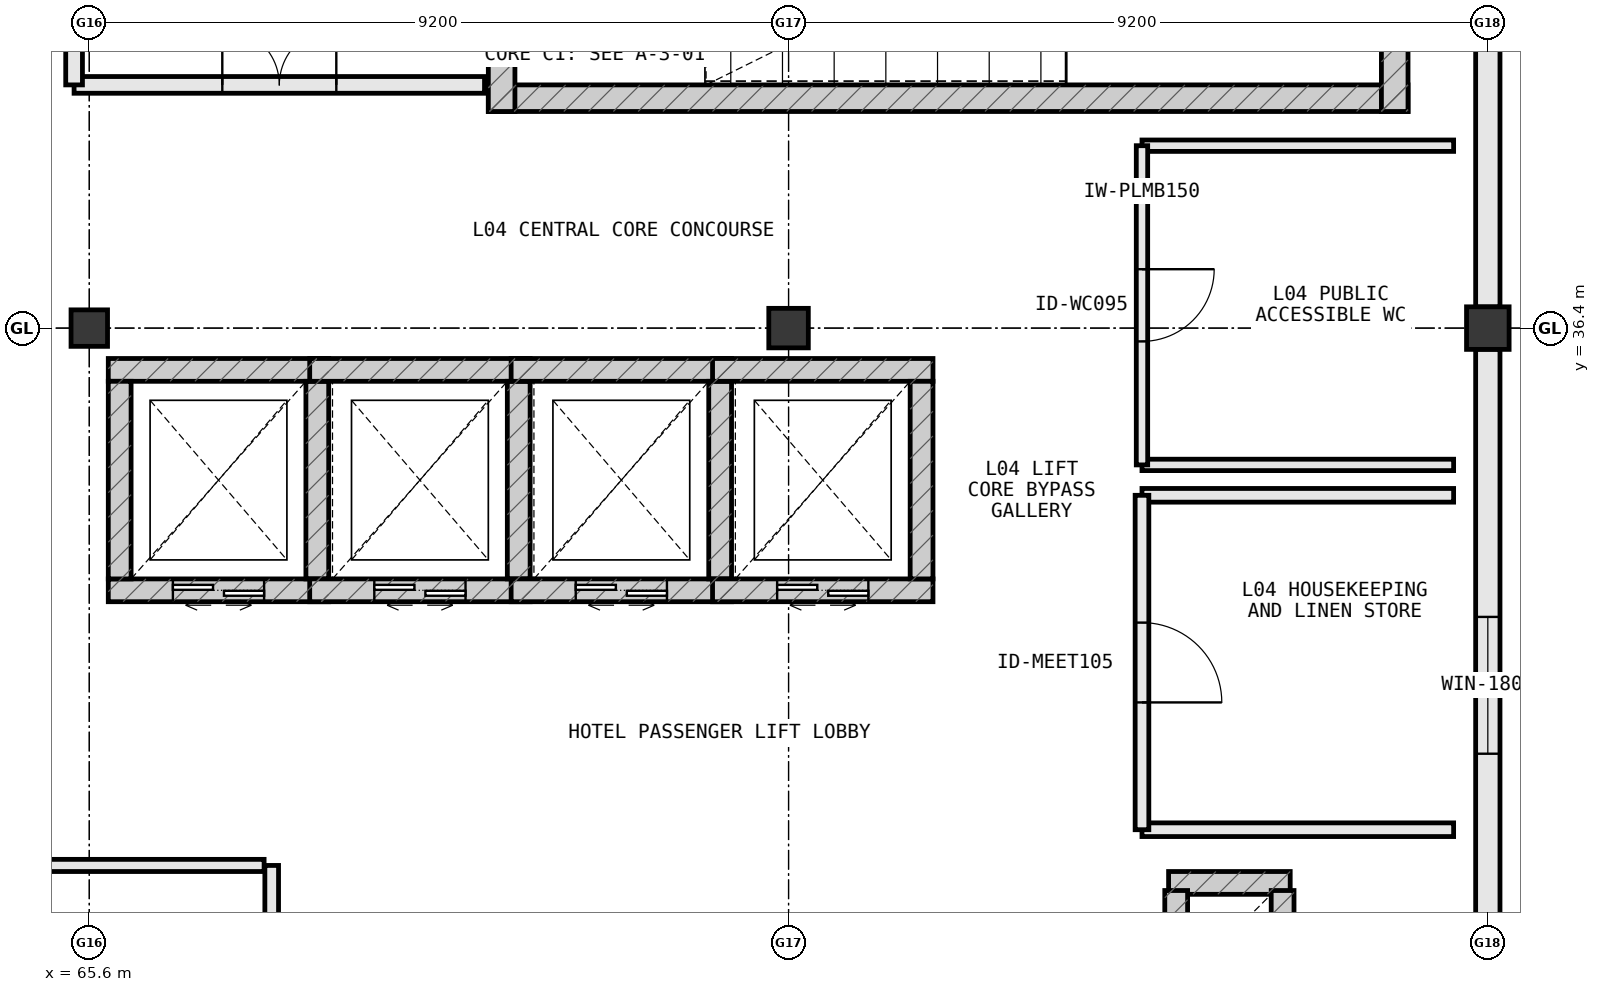
"""IFC4 building model, lengths in metres.
Left out: names, types, materials, properties, quantities, classifications, styles, units other than length and angle.
Written with IfcOpenShell. Run it as: python <this file> out.ifc"""

import sys

from ifc_helpers import new_model, si_unit, direction, frame, frame_2d, origin, origin_2d, place, context, subcontext, project, spatial, rectangle, extrude, element, fill, save


model = new_model("IFC4")
c1 = context("Model", 3, precision=1e-05, world=origin(), true_north=direction((0.0, 1.0)))
c2 = subcontext(c1, "Body", "Model", "MODEL_VIEW")
j1 = project(units=[si_unit("LENGTHUNIT", "METRE"), si_unit("PLANEANGLEUNIT", "RADIAN")], contexts=[c1])
p1 = place(None, origin())
s1 = spatial("IfcSite", under=j1, at=p1, CompositionType="ELEMENT")
p2 = place(p1, origin())
s2 = spatial("IfcBuilding", under=s1, at=p2, CompositionType="ELEMENT")
p3 = place(p2, frame((0.0, 0.0, 20.0)))
s3 = spatial("IfcBuildingStorey", under=s2, at=p3, CompositionType="ELEMENT", Elevation=20.0)
p4 = place(p3, frame((74.8, 36.4, 0.0), z_axis=(0.0, 0.0, 1.0), x_axis=(1.0, 0.0, 0.0)))
e1 = element("IfcColumn", 1, at=p4, inside=s3, PredefinedType="COLUMN", context=c2, shape_type="SweptSolid", body=[
    extrude(rectangle(XDim=0.52, YDim=0.52, at=origin_2d()), origin(), (0.0, 0.0, 1.0), 3.8),
])
p5 = place(p3, frame((84.0, 36.4, 0.0), z_axis=(0.0, 0.0, 1.0), x_axis=(1.0, 0.0, 0.0)))
e2 = element("IfcColumn", 2, at=p5, inside=s3, PredefinedType="COLUMN", context=c2, shape_type="SweptSolid", body=[
    extrude(rectangle(XDim=0.56, YDim=0.56, at=origin_2d()), origin(), (0.0, 0.0, 1.0), 3.8),
])
p6 = place(p3, frame((65.6, 36.4, 0.0), z_axis=(0.0, 0.0, 1.0), x_axis=(1.0, 0.0, 0.0)))
e3 = element("IfcColumn", 3, at=p6, inside=s3, PredefinedType="COLUMN", context=c2, shape_type="SweptSolid", body=[
    extrude(rectangle(XDim=0.48, YDim=0.48, at=origin_2d()), origin(), (0.0, 0.0, 1.0), 3.8),
])
p7 = place(p3, frame((81.4, 29.1, 0.0), z_axis=(0.0, 0.0, 1.0), x_axis=(-1.0, 0.0, 0.0)))
e4 = element("IfcWall", 4, at=p7, inside=s3, PredefinedType="SHEAR", context=c2, shape_type="SweptSolid", body=[
    extrude(rectangle(XDim=1.6, YDim=0.3, at=frame_2d((0.8, 0.0))), origin(), (0.0, 0.0, 1.0), 3.55),
])
for number, where, z_axis, x_axis in (
    (5, (79.9, 29.0, 0.0), (0.0, 0.0, 1.0), (0.0, -1.0, 0.0)),
    (6, (81.3, 27.8, 0.0), (0.0, 0.0, 1.0), (0.0, 1.0, 0.0)),
):
    element("IfcWall", number, at=place(p3, frame(where, z_axis=z_axis, x_axis=x_axis)), inside=s3, PredefinedType="SHEAR", context=c2, shape_type="SweptSolid", body=[
        extrude(rectangle(XDim=1.2, YDim=0.3, at=frame_2d((0.6, 0.0))), origin(), (0.0, 0.0, 1.0), 3.55),
    ])
p8 = place(p3, frame((84.0, 27.278, 0.0), z_axis=(0.0, 0.0, 1.0), x_axis=(0.0, 1.0, 0.0)))
e7 = element("IfcWall", 7, at=p8, inside=s3, PredefinedType="STANDARD", context=c2, shape_type="SweptSolid", body=[
    extrude(rectangle(XDim=8.844, YDim=0.32, at=frame_2d((4.422, 0.0))), origin(), (0.0, 0.0, 1.0), 2.965),
])
p9 = place(p8, frame((3.522, 0.0, 0.85)))
e8 = element("IfcOpeningElement", 8, at=p9, cuts=e7, PredefinedType="OPENING", context=c2, shape_type="SweptSolid", body=[
    extrude(rectangle(XDim=1.8, YDim=1.85, at=frame_2d((0.9, 0.925))), frame((0.0, 0.172, 0.0), z_axis=(0.0, -1.0, 0.0), x_axis=(1.0, 0.0, 0.0)), (0.0, 0.0, 1.0), 0.344),
])
p10 = place(p3, frame((84.0, 36.678, 0.0), z_axis=(0.0, 0.0, 1.0), x_axis=(0.0, 1.0, 0.0)))
e9 = element("IfcWall", 9, at=p10, inside=s3, PredefinedType="STANDARD", context=c2, shape_type="SweptSolid", body=[
    extrude(rectangle(XDim=10.244, YDim=0.32, at=frame_2d((5.122, 0.0))), origin(), (0.0, 0.0, 1.0), 2.965),
])
p11 = place(p10, frame((6.783, 0.0, 0.85)))
e10 = element("IfcOpeningElement", 10, at=p11, cuts=e9, PredefinedType="OPENING", context=c2, shape_type="SweptSolid", body=[
    extrude(rectangle(XDim=1.8, YDim=1.85, at=frame_2d((0.9, 0.925))), frame((0.0, 0.172, 0.0), z_axis=(0.0, -1.0, 0.0), x_axis=(1.0, 0.0, 0.0)), (0.0, 0.0, 1.0), 0.344),
])
p12 = place(p3, frame((70.85, 39.425, 0.0), z_axis=(0.0, 0.0, 1.0), x_axis=(1.0, 0.0, 0.0)))
e11 = element("IfcWall", 11, at=p12, inside=s3, PredefinedType="SHEAR", context=c2, shape_type="SweptSolid", body=[
    extrude(rectangle(XDim=12.1, YDim=0.35, at=frame_2d((6.05, 0.0))), origin(), (0.0, 0.0, 1.0), 3.8),
])
p13 = place(p3, frame((82.775, 39.25, 0.0), z_axis=(0.0, 0.0, 1.0), x_axis=(0.0, 1.0, 0.0)))
e12 = element("IfcWall", 12, at=p13, inside=s3, PredefinedType="SHEAR", context=c2, shape_type="SweptSolid", body=[
    extrude(rectangle(XDim=5.1, YDim=0.35, at=frame_2d((2.55, 0.0))), origin(), (0.0, 0.0, 1.0), 3.8),
])
p14 = place(p3, frame((71.025, 44.35, 0.0), z_axis=(0.0, 0.0, 1.0), x_axis=(0.0, -1.0, 0.0)))
e13 = element("IfcWall", 13, at=p14, inside=s3, PredefinedType="SHEAR", context=c2, shape_type="SweptSolid", body=[
    extrude(rectangle(XDim=5.1, YDim=0.35, at=frame_2d((2.55, 0.0))), origin(), (0.0, 0.0, 1.0), 3.8),
])
p15 = place(p14, frame((2.0, 0.0, 0.0)))
e14 = element("IfcOpeningElement", 14, at=p15, cuts=e13, PredefinedType="OPENING", context=c2, shape_type="SweptSolid", body=[
    extrude(rectangle(XDim=1.1, YDim=2.2, at=frame_2d((0.55, 1.1))), frame((0.0, 0.187, 0.0), z_axis=(0.0, -1.0, 0.0), x_axis=(1.0, 0.0, 0.0)), (0.0, 0.0, 1.0), 0.374),
])
p16 = place(p3, frame((65.85, 32.95, 0.0), z_axis=(0.0, 0.0, 1.0), x_axis=(1.0, 0.0, 0.0)))
e15 = element("IfcWall", 15, at=p16, inside=s3, PredefinedType="SHEAR", context=c2, shape_type="SweptSolid", body=[
    extrude(rectangle(XDim=2.9, YDim=0.3, at=frame_2d((1.45, 0.0))), origin(), (0.0, 0.0, 1.0), 3.8),
])
p17 = place(p16, frame((0.85, 0.0, 0.0)))
e16 = element("IfcOpeningElement", 16, at=p17, cuts=e15, PredefinedType="OPENING", context=c2, shape_type="SweptSolid", body=[
    extrude(rectangle(XDim=1.2, YDim=2.2, at=frame_2d((0.6, 1.1))), frame((0.0, 0.162, 0.0), z_axis=(0.0, -1.0, 0.0), x_axis=(1.0, 0.0, 0.0)), (0.0, 0.0, 1.0), 0.324),
])
p18 = place(p3, frame((68.75, 35.85, 0.0), z_axis=(0.0, 0.0, 1.0), x_axis=(-1.0, 0.0, 0.0)))
e17 = element("IfcWall", 17, at=p18, inside=s3, PredefinedType="SHEAR", context=c2, shape_type="SweptSolid", body=[
    extrude(rectangle(XDim=2.9, YDim=0.3, at=frame_2d((1.45, 0.0))), origin(), (0.0, 0.0, 1.0), 3.8),
])
for number, where, z_axis, x_axis in (
    (18, (68.6, 33.1, 0.0), (0.0, 0.0, 1.0), (0.0, 1.0, 0.0)),
    (19, (66.0, 35.7, 0.0), (0.0, 0.0, 1.0), (0.0, -1.0, 0.0)),
):
    element("IfcWall", number, at=place(p3, frame(where, z_axis=z_axis, x_axis=x_axis)), inside=s3, PredefinedType="SHEAR", context=c2, shape_type="SweptSolid", body=[
        extrude(rectangle(XDim=2.6, YDim=0.3, at=frame_2d((1.3, 0.0))), origin(), (0.0, 0.0, 1.0), 3.8),
    ])
p19 = place(p3, frame((68.5, 32.95, 0.0), z_axis=(0.0, 0.0, 1.0), x_axis=(1.0, 0.0, 0.0)))
e20 = element("IfcWall", 20, at=p19, inside=s3, PredefinedType="SHEAR", context=c2, shape_type="SweptSolid", body=[
    extrude(rectangle(XDim=2.9, YDim=0.3, at=frame_2d((1.45, 0.0))), origin(), (0.0, 0.0, 1.0), 3.8),
])
p20 = place(p19, frame((0.85, 0.0, 0.0)))
e21 = element("IfcOpeningElement", 21, at=p20, cuts=e20, PredefinedType="OPENING", context=c2, shape_type="SweptSolid", body=[
    extrude(rectangle(XDim=1.2, YDim=2.2, at=frame_2d((0.6, 1.1))), frame((0.0, 0.162, 0.0), z_axis=(0.0, -1.0, 0.0), x_axis=(1.0, 0.0, 0.0)), (0.0, 0.0, 1.0), 0.324),
])
p21 = place(p3, frame((71.4, 35.85, 0.0), z_axis=(0.0, 0.0, 1.0), x_axis=(-1.0, 0.0, 0.0)))
e22 = element("IfcWall", 22, at=p21, inside=s3, PredefinedType="SHEAR", context=c2, shape_type="SweptSolid", body=[
    extrude(rectangle(XDim=2.9, YDim=0.3, at=frame_2d((1.45, 0.0))), origin(), (0.0, 0.0, 1.0), 3.8),
])
p22 = place(p3, frame((71.25, 33.1, 0.0), z_axis=(0.0, 0.0, 1.0), x_axis=(0.0, 1.0, 0.0)))
e23 = element("IfcWall", 23, at=p22, inside=s3, PredefinedType="SHEAR", context=c2, shape_type="SweptSolid", body=[
    extrude(rectangle(XDim=2.6, YDim=0.3, at=frame_2d((1.3, 0.0))), origin(), (0.0, 0.0, 1.0), 3.8),
])
p23 = place(p3, frame((71.15, 32.95, 0.0), z_axis=(0.0, 0.0, 1.0), x_axis=(1.0, 0.0, 0.0)))
e24 = element("IfcWall", 24, at=p23, inside=s3, PredefinedType="SHEAR", context=c2, shape_type="SweptSolid", body=[
    extrude(rectangle(XDim=2.9, YDim=0.3, at=frame_2d((1.45, 0.0))), origin(), (0.0, 0.0, 1.0), 3.8),
])
p24 = place(p23, frame((0.85, 0.0, 0.0)))
e25 = element("IfcOpeningElement", 25, at=p24, cuts=e24, PredefinedType="OPENING", context=c2, shape_type="SweptSolid", body=[
    extrude(rectangle(XDim=1.2, YDim=2.2, at=frame_2d((0.6, 1.1))), frame((0.0, 0.162, 0.0), z_axis=(0.0, -1.0, 0.0), x_axis=(1.0, 0.0, 0.0)), (0.0, 0.0, 1.0), 0.324),
])
p25 = place(p3, frame((74.05, 35.85, 0.0), z_axis=(0.0, 0.0, 1.0), x_axis=(-1.0, 0.0, 0.0)))
e26 = element("IfcWall", 26, at=p25, inside=s3, PredefinedType="SHEAR", context=c2, shape_type="SweptSolid", body=[
    extrude(rectangle(XDim=2.9, YDim=0.3, at=frame_2d((1.45, 0.0))), origin(), (0.0, 0.0, 1.0), 3.8),
])
p26 = place(p3, frame((73.9, 33.1, 0.0), z_axis=(0.0, 0.0, 1.0), x_axis=(0.0, 1.0, 0.0)))
e27 = element("IfcWall", 27, at=p26, inside=s3, PredefinedType="SHEAR", context=c2, shape_type="SweptSolid", body=[
    extrude(rectangle(XDim=2.6, YDim=0.3, at=frame_2d((1.3, 0.0))), origin(), (0.0, 0.0, 1.0), 3.8),
])
p27 = place(p3, frame((73.8, 32.95, 0.0), z_axis=(0.0, 0.0, 1.0), x_axis=(1.0, 0.0, 0.0)))
e28 = element("IfcWall", 28, at=p27, inside=s3, PredefinedType="SHEAR", context=c2, shape_type="SweptSolid", body=[
    extrude(rectangle(XDim=2.9, YDim=0.3, at=frame_2d((1.45, 0.0))), origin(), (0.0, 0.0, 1.0), 3.8),
])
p28 = place(p27, frame((0.85, 0.0, 0.0)))
e29 = element("IfcOpeningElement", 29, at=p28, cuts=e28, PredefinedType="OPENING", context=c2, shape_type="SweptSolid", body=[
    extrude(rectangle(XDim=1.2, YDim=2.2, at=frame_2d((0.6, 1.1))), frame((0.0, 0.162, 0.0), z_axis=(0.0, -1.0, 0.0), x_axis=(1.0, 0.0, 0.0)), (0.0, 0.0, 1.0), 0.324),
])
p29 = place(p3, frame((76.7, 35.85, 0.0), z_axis=(0.0, 0.0, 1.0), x_axis=(-1.0, 0.0, 0.0)))
e30 = element("IfcWall", 30, at=p29, inside=s3, PredefinedType="SHEAR", context=c2, shape_type="SweptSolid", body=[
    extrude(rectangle(XDim=2.9, YDim=0.3, at=frame_2d((1.45, 0.0))), origin(), (0.0, 0.0, 1.0), 3.8),
])
p30 = place(p3, frame((76.55, 33.1, 0.0), z_axis=(0.0, 0.0, 1.0), x_axis=(0.0, 1.0, 0.0)))
e31 = element("IfcWall", 31, at=p30, inside=s3, PredefinedType="SHEAR", context=c2, shape_type="SweptSolid", body=[
    extrude(rectangle(XDim=2.6, YDim=0.3, at=frame_2d((1.3, 0.0))), origin(), (0.0, 0.0, 1.0), 3.8),
])
p31 = place(p3, frame((65.4, 39.6, 0.0), z_axis=(0.0, 0.0, 1.0), x_axis=(1.0, 0.0, 0.0)))
e32 = element("IfcWall", 32, at=p31, inside=s3, PredefinedType="STANDARD", context=c2, shape_type="SweptSolid", body=[
    extrude(rectangle(XDim=5.4, YDim=0.22, at=frame_2d((2.7, 0.0))), origin(), (0.0, 0.0, 1.0), 3.55),
])
p32 = place(p31, frame((1.95, 0.0, 0.0)))
e33 = element("IfcOpeningElement", 33, at=p32, cuts=e32, PredefinedType="OPENING", context=c2, shape_type="SweptSolid", body=[
    extrude(rectangle(XDim=1.5, YDim=2.2, at=frame_2d((0.75, 1.1))), frame((0.0, 0.122, 0.0), z_axis=(0.0, -1.0, 0.0), x_axis=(1.0, 0.0, 0.0)), (0.0, 0.0, 1.0), 0.244),
])
p33 = place(p3, frame((65.4, 43.85, 0.0), z_axis=(0.0, 0.0, 1.0), x_axis=(0.0, -1.0, 0.0)))
e34 = element("IfcWall", 34, at=p33, inside=s3, PredefinedType="STANDARD", context=c2, shape_type="SweptSolid", body=[
    extrude(rectangle(XDim=4.25, YDim=0.22, at=frame_2d((2.125, 0.0))), origin(), (0.0, 0.0, 1.0), 3.55),
])
p34 = place(p33, frame((1.375, 0.0, 0.0)))
e35 = element("IfcOpeningElement", 35, at=p34, cuts=e34, PredefinedType="OPENING", context=c2, shape_type="SweptSolid", body=[
    extrude(rectangle(XDim=1.5, YDim=2.2, at=frame_2d((0.75, 1.1))), frame((0.0, 0.122, 0.0), z_axis=(0.0, -1.0, 0.0), x_axis=(1.0, 0.0, 0.0)), (0.0, 0.0, 1.0), 0.244),
])
for number, where, z_axis, x_axis in (
    (36, (79.45, 29.8, 0.0), (0.0, 0.0, 1.0), (1.0, 0.0, 0.0)),
    (37, (83.55, 34.2, 0.0), (0.0, 0.0, 1.0), (-1.0, 0.0, 0.0)),
):
    element("IfcWall", number, at=place(p3, frame(where, z_axis=z_axis, x_axis=x_axis)), inside=s3, PredefinedType="PARTITIONING", context=c2, shape_type="SweptSolid", body=[
        extrude(rectangle(XDim=4.1, YDim=0.18, at=frame_2d((2.05, 0.0))), origin(), (0.0, 0.0, 1.0), 3.55),
    ])
p35 = place(p3, frame((79.45, 34.2, 0.0), z_axis=(0.0, 0.0, 1.0), x_axis=(0.0, -1.0, 0.0)))
e38 = element("IfcWall", 38, at=p35, inside=s3, PredefinedType="PARTITIONING", context=c2, shape_type="SweptSolid", body=[
    extrude(rectangle(XDim=4.4, YDim=0.18, at=frame_2d((2.2, 0.0))), origin(), (0.0, 0.0, 1.0), 3.55),
])
p36 = place(p35, frame((1.675, 0.0, 0.0)))
e39 = element("IfcOpeningElement", 39, at=p36, cuts=e38, PredefinedType="OPENING", context=c2, shape_type="SweptSolid", body=[
    extrude(rectangle(XDim=1.05, YDim=2.2, at=frame_2d((0.525, 1.1))), frame((0.0, 0.102, 0.0), z_axis=(0.0, -1.0, 0.0), x_axis=(1.0, 0.0, 0.0)), (0.0, 0.0, 1.0), 0.204),
])
for number, where, z_axis, x_axis in (
    (40, (79.45, 34.6, 0.0), (0.0, 0.0, 1.0), (1.0, 0.0, 0.0)),
    (41, (83.55, 38.8, 0.0), (0.0, 0.0, 1.0), (-1.0, 0.0, 0.0)),
):
    element("IfcWall", number, at=place(p3, frame(where, z_axis=z_axis, x_axis=x_axis)), inside=s3, PredefinedType="PLUMBINGWALL", context=c2, shape_type="SweptSolid", body=[
        extrude(rectangle(XDim=4.1, YDim=0.15, at=frame_2d((2.05, 0.0))), origin(), (0.0, 0.0, 1.0), 3.55),
    ])
p37 = place(p3, frame((79.45, 38.8, 0.0), z_axis=(0.0, 0.0, 1.0), x_axis=(0.0, -1.0, 0.0)))
e42 = element("IfcWall", 42, at=p37, inside=s3, PredefinedType="PLUMBINGWALL", context=c2, shape_type="SweptSolid", body=[
    extrude(rectangle(XDim=4.2, YDim=0.15, at=frame_2d((2.1, 0.0))), origin(), (0.0, 0.0, 1.0), 3.55),
])
p38 = place(p37, frame((1.625, 0.0, 0.0)))
e43 = element("IfcOpeningElement", 43, at=p38, cuts=e42, PredefinedType="OPENING", context=c2, shape_type="SweptSolid", body=[
    extrude(rectangle(XDim=0.95, YDim=2.15, at=frame_2d((0.475, 1.075))), frame((0.0, 0.087, 0.0), z_axis=(0.0, -1.0, 0.0), x_axis=(1.0, 0.0, 0.0)), (0.0, 0.0, 1.0), 0.174),
])
p39 = place(p3, frame((68.0, 22.97, 0.0), z_axis=(0.0, 0.0, 1.0), x_axis=(0.0, 1.0, 0.0)))
e44 = element("IfcWall", 44, at=p39, inside=s3, PredefinedType="PARTITIONING", context=c2, shape_type="SweptSolid", body=[
    extrude(rectangle(XDim=6.36, YDim=0.18, at=frame_2d((3.18, 0.0))), origin(), (0.0, 0.0, 1.0), 3.55),
])
p40 = place(p39, frame((3.66, 0.0, 0.0)))
e45 = element("IfcOpeningElement", 45, at=p40, cuts=e44, PredefinedType="OPENING", context=c2, shape_type="SweptSolid", body=[
    extrude(rectangle(XDim=1.0, YDim=2.2, at=frame_2d((0.5, 1.1))), frame((0.0, 0.102, 0.0), z_axis=(0.0, -1.0, 0.0), x_axis=(1.0, 0.0, 0.0)), (0.0, 0.0, 1.0), 0.204),
])
p41 = place(p3, frame((60.96, 29.33, 0.0), z_axis=(0.0, 0.0, 1.0), x_axis=(1.0, 0.0, 0.0)))
e46 = element("IfcWall", 46, at=p41, inside=s3, PredefinedType="PARTITIONING", context=c2, shape_type="SweptSolid", body=[
    extrude(rectangle(XDim=6.94, YDim=0.16, at=frame_2d((3.47, 0.0))), origin(), (0.0, 0.0, 1.0), 3.55),
])
p42 = place(p9, origin())
e47 = element("IfcWindow", 47, at=p42, inside=s3, PartitioningType="SINGLE_PANEL", PredefinedType="WINDOW", context=c2, shape_type="SweptSolid", body=[
    extrude(rectangle(XDim=1.8, YDim=1.85, at=frame_2d((0.9, 0.925))), frame((0.0, 0.03, 0.0), z_axis=(0.0, -1.0, 0.0), x_axis=(1.0, 0.0, 0.0)), (0.0, 0.0, 1.0), 0.06),
])
fill(e8, e47)
p43 = place(p17, origin())
e48 = element("IfcDoor", 48, at=p43, inside=s3, OperationType="DOUBLE_DOOR_SLIDING", PredefinedType="DOOR", context=c2, shape_type="SweptSolid", body=[
    extrude(rectangle(XDim=1.2, YDim=2.2, at=frame_2d((0.6, 1.1))), frame((0.0, 0.025, 0.0), z_axis=(0.0, -1.0, 0.0), x_axis=(1.0, 0.0, 0.0)), (0.0, 0.0, 1.0), 0.05),
])
fill(e16, e48)
p44 = place(p20, origin())
e49 = element("IfcDoor", 49, at=p44, inside=s3, OperationType="DOUBLE_DOOR_SLIDING", PredefinedType="DOOR", context=c2, shape_type="SweptSolid", body=[
    extrude(rectangle(XDim=1.2, YDim=2.2, at=frame_2d((0.6, 1.1))), frame((0.0, 0.025, 0.0), z_axis=(0.0, -1.0, 0.0), x_axis=(1.0, 0.0, 0.0)), (0.0, 0.0, 1.0), 0.05),
])
fill(e21, e49)
p45 = place(p24, origin())
e50 = element("IfcDoor", 50, at=p45, inside=s3, OperationType="DOUBLE_DOOR_SLIDING", PredefinedType="DOOR", context=c2, shape_type="SweptSolid", body=[
    extrude(rectangle(XDim=1.2, YDim=2.2, at=frame_2d((0.6, 1.1))), frame((0.0, 0.025, 0.0), z_axis=(0.0, -1.0, 0.0), x_axis=(1.0, 0.0, 0.0)), (0.0, 0.0, 1.0), 0.05),
])
fill(e25, e50)
p46 = place(p28, origin())
e51 = element("IfcDoor", 51, at=p46, inside=s3, OperationType="DOUBLE_DOOR_SLIDING", PredefinedType="DOOR", context=c2, shape_type="SweptSolid", body=[
    extrude(rectangle(XDim=1.2, YDim=2.2, at=frame_2d((0.6, 1.1))), frame((0.0, 0.025, 0.0), z_axis=(0.0, -1.0, 0.0), x_axis=(1.0, 0.0, 0.0)), (0.0, 0.0, 1.0), 0.05),
])
fill(e29, e51)
p47 = place(p32, origin())
e52 = element("IfcDoor", 52, at=p47, inside=s3, OperationType="DOUBLE_DOOR_SINGLE_SWING", PredefinedType="DOOR", context=c2, shape_type="SweptSolid", body=[
    extrude(rectangle(XDim=1.5, YDim=2.2, at=frame_2d((0.75, 1.1))), frame((0.0, 0.025, 0.0), z_axis=(0.0, -1.0, 0.0), x_axis=(1.0, 0.0, 0.0)), (0.0, 0.0, 1.0), 0.05),
])
fill(e33, e52)
p48 = place(p36, origin())
e53 = element("IfcDoor", 53, at=p48, inside=s3, OperationType="SINGLE_SWING_RIGHT", PredefinedType="DOOR", context=c2, shape_type="SweptSolid", body=[
    extrude(rectangle(XDim=1.05, YDim=2.2, at=frame_2d((0.525, 1.1))), frame((0.0, 0.025, 0.0), z_axis=(0.0, -1.0, 0.0), x_axis=(1.0, 0.0, 0.0)), (0.0, 0.0, 1.0), 0.05),
])
fill(e39, e53)
p49 = place(p38, origin())
e54 = element("IfcDoor", 54, at=p49, inside=s3, OperationType="SINGLE_SWING_LEFT", PredefinedType="DOOR", context=c2, shape_type="SweptSolid", body=[
    extrude(rectangle(XDim=0.95, YDim=2.15, at=frame_2d((0.475, 1.075))), frame((0.0, 0.025, 0.0), z_axis=(0.0, -1.0, 0.0), x_axis=(1.0, 0.0, 0.0)), (0.0, 0.0, 1.0), 0.05),
])
fill(e43, e54)
save(model, sys.argv[1])
